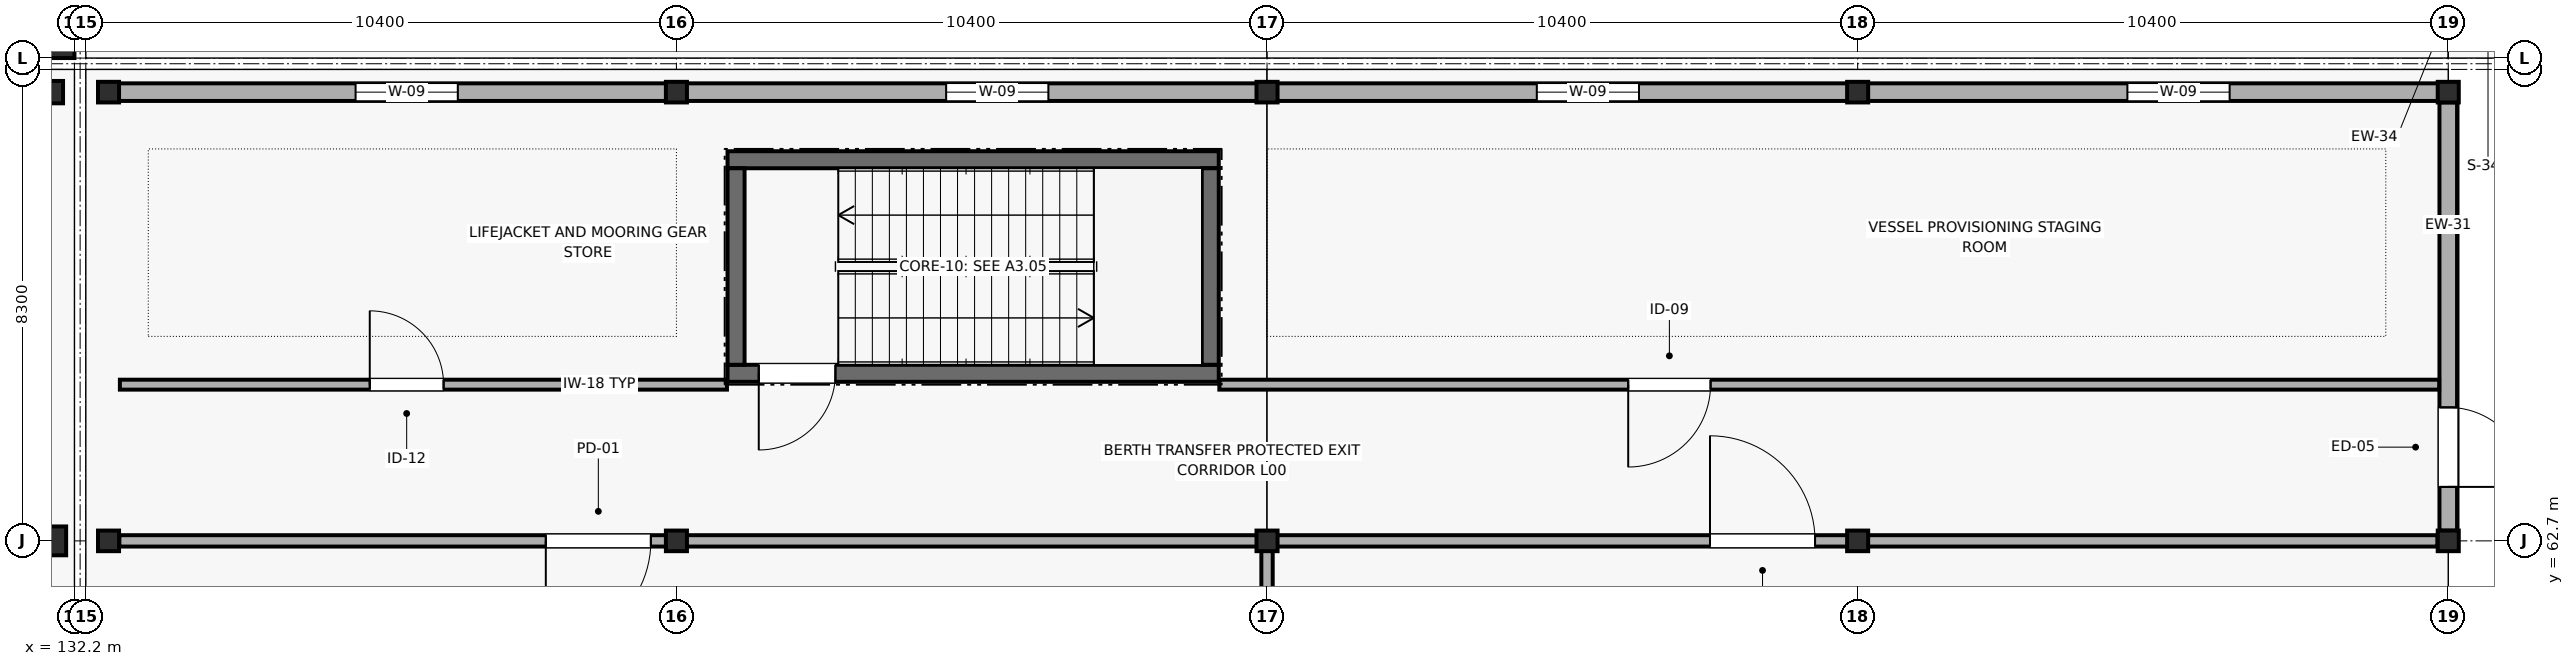
"""IFC4 building model, lengths in metres.
Left out: names, types, materials, properties, quantities, classifications, styles, units other than length and angle.
Written with IfcOpenShell. Run it as: python <this file> out.ifc"""

import sys

from ifc_helpers import new_model, si_unit, direction, frame, frame_2d, origin, origin_2d, place, context, subcontext, project, spatial, rectangle, hollow_circle, i_section, extrude, element, fill, save


model = new_model("IFC4")
c1 = context("Model", 3, precision=1e-05, world=origin(), true_north=direction((0.0, 1.0)))
c2 = subcontext(c1, "Body", "Model", "MODEL_VIEW")
j1 = project(units=[si_unit("LENGTHUNIT", "METRE"), si_unit("PLANEANGLEUNIT", "RADIAN")], contexts=[c1])
p1 = place(None, origin())
s1 = spatial("IfcSite", under=j1, at=p1, CompositionType="ELEMENT")
p2 = place(p1, origin())
s2 = spatial("IfcBuilding", under=s1, at=p2, CompositionType="ELEMENT")
p3 = place(p2, origin())
s3 = spatial("IfcBuildingStorey", under=s2, at=p3, CompositionType="ELEMENT", Elevation=0.0)
p4 = place(p3, frame((131.8, 62.7, 0.0), z_axis=(0.0, 0.0, 1.0), x_axis=(1.0, 0.0, 0.0)))
e1 = element("IfcColumn", 1, at=p4, inside=s3, PredefinedType="COLUMN", context=c2, shape_type="SweptSolid", body=[
    extrude(hollow_circle(Radius=0.254, WallThickness=0.012, at=origin_2d()), origin(), (0.0, 0.0, 1.0), 5.4),
])
p5 = place(p3, frame((131.8, 70.6, 0.0), z_axis=(0.0, 0.0, 1.0), x_axis=(1.0, 0.0, 0.0)))
e2 = element("IfcColumn", 2, at=p5, inside=s3, PredefinedType="COLUMN", context=c2, shape_type="SweptSolid", body=[
    extrude(i_section(OverallWidth=0.399, OverallDepth=0.394, WebThickness=0.023, FlangeThickness=0.037, FilletRadius=0.018, at=origin_2d()), origin(), (0.0, 0.0, 1.0), 5.4),
])
for number, where, z_axis, x_axis in (
    (3, (132.8, 62.7, 0.0), (0.0, 0.0, 1.0), (1.0, 0.0, 0.0)),
    (4, (132.8, 70.6, 0.0), (0.0, 0.0, 1.0), (1.0, 0.0, 0.0)),
    (5, (142.8, 62.7, 0.0), (0.0, 0.0, 1.0), (1.0, 0.0, 0.0)),
    (6, (142.8, 70.6, 0.0), (0.0, 0.0, 1.0), (1.0, 0.0, 0.0)),
    (7, (153.2, 62.7, 0.0), (0.0, 0.0, 1.0), (1.0, 0.0, 0.0)),
    (8, (153.2, 70.6, 0.0), (0.0, 0.0, 1.0), (1.0, 0.0, 0.0)),
    (9, (163.6, 62.7, 0.0), (0.0, 0.0, 1.0), (1.0, 0.0, 0.0)),
    (10, (163.6, 70.6, 0.0), (0.0, 0.0, 1.0), (1.0, 0.0, 0.0)),
    (11, (174.0, 62.7, 0.0), (0.0, 0.0, 1.0), (1.0, 0.0, 0.0)),
    (12, (174.0, 70.6, 0.0), (0.0, 0.0, 1.0), (1.0, 0.0, 0.0)),
):
    element("IfcColumn", number, at=place(p3, frame(where, z_axis=z_axis, x_axis=x_axis)), inside=s3, PredefinedType="COLUMN", context=c2, shape_type="SweptSolid", body=[
        extrude(i_section(OverallWidth=0.371, OverallDepth=0.363, WebThickness=0.013, FlangeThickness=0.022, FilletRadius=0.018, at=origin_2d()), origin(), (0.0, 0.0, 1.0), 5.4),
    ])
p6 = place(p3, frame((131.8, 71.6, 0.0), z_axis=(0.0, 0.0, 1.0), x_axis=(1.0, 0.0, 0.0)))
e13 = element("IfcColumn", 13, at=p6, inside=s3, PredefinedType="COLUMN", context=c2, shape_type="SweptSolid", body=[
    extrude(rectangle(XDim=0.8, YDim=0.8, at=origin_2d()), origin(), (0.0, 0.0, 1.0), 5.4),
])
p7 = place(p3, frame((174.0, 62.88, 0.0), z_axis=(0.0, 0.0, 1.0), x_axis=(0.0, 1.0, 0.0)))
e14 = element("IfcWall", 14, at=p7, inside=s3, PredefinedType="SOLIDWALL", context=c2, shape_type="SweptSolid", body=[
    extrude(rectangle(XDim=7.541, YDim=0.31, at=frame_2d((3.771, 0.0))), origin(), (0.0, 0.0, 1.0), 4.622),
])
p8 = place(p7, frame((0.771, 0.0, 0.0)))
e15 = element("IfcOpeningElement", 15, at=p8, cuts=e14, PredefinedType="OPENING", context=c2, shape_type="SweptSolid", body=[
    extrude(rectangle(XDim=1.4, YDim=2.25, at=frame_2d((0.7, 1.125))), frame((0.0, 0.165, 0.0), z_axis=(0.0, -1.0, 0.0), x_axis=(1.0, 0.0, 0.0)), (0.0, 0.0, 1.0), 0.33),
])
p9 = place(p3, frame((142.795, 70.6, 0.0), z_axis=(0.0, 0.0, 1.0), x_axis=(-1.0, 0.0, 0.0)))
e16 = element("IfcWall", 16, at=p9, inside=s3, PredefinedType="SOLIDWALL", context=c2, shape_type="SweptSolid", body=[
    extrude(rectangle(XDim=9.991, YDim=0.31, at=frame_2d((4.995, 0.0))), origin(), (0.0, 0.0, 1.0), 4.558),
])
p10 = place(p9, frame((3.845, 0.0, 1.05)))
e17 = element("IfcOpeningElement", 17, at=p10, cuts=e16, PredefinedType="OPENING", context=c2, shape_type="SweptSolid", body=[
    extrude(rectangle(XDim=1.8, YDim=1.8, at=frame_2d((0.9, 0.9))), frame((0.0, 0.165, 0.0), z_axis=(0.0, -1.0, 0.0), x_axis=(1.0, 0.0, 0.0)), (0.0, 0.0, 1.0), 0.33),
])
p11 = place(p3, frame((153.195, 70.6, 0.0), z_axis=(0.0, 0.0, 1.0), x_axis=(-1.0, 0.0, 0.0)))
e18 = element("IfcWall", 18, at=p11, inside=s3, PredefinedType="SOLIDWALL", context=c2, shape_type="SweptSolid", body=[
    extrude(rectangle(XDim=10.391, YDim=0.31, at=frame_2d((5.195, 0.0))), origin(), (0.0, 0.0, 1.0), 4.558),
])
p12 = place(p11, frame((3.845, 0.0, 1.05)))
e19 = element("IfcOpeningElement", 19, at=p12, cuts=e18, PredefinedType="OPENING", context=c2, shape_type="SweptSolid", body=[
    extrude(rectangle(XDim=1.8, YDim=1.8, at=frame_2d((0.9, 0.9))), frame((0.0, 0.165, 0.0), z_axis=(0.0, -1.0, 0.0), x_axis=(1.0, 0.0, 0.0)), (0.0, 0.0, 1.0), 0.33),
])
p13 = place(p3, frame((163.595, 70.6, 0.0), z_axis=(0.0, 0.0, 1.0), x_axis=(-1.0, 0.0, 0.0)))
e20 = element("IfcWall", 20, at=p13, inside=s3, PredefinedType="SOLIDWALL", context=c2, shape_type="SweptSolid", body=[
    extrude(rectangle(XDim=10.391, YDim=0.31, at=frame_2d((5.195, 0.0))), origin(), (0.0, 0.0, 1.0), 4.558),
])
p14 = place(p13, frame((3.845, 0.0, 1.05)))
e21 = element("IfcOpeningElement", 21, at=p14, cuts=e20, PredefinedType="OPENING", context=c2, shape_type="SweptSolid", body=[
    extrude(rectangle(XDim=1.8, YDim=1.8, at=frame_2d((0.9, 0.9))), frame((0.0, 0.165, 0.0), z_axis=(0.0, -1.0, 0.0), x_axis=(1.0, 0.0, 0.0)), (0.0, 0.0, 1.0), 0.33),
])
p15 = place(p3, frame((173.995, 70.6, 0.0), z_axis=(0.0, 0.0, 1.0), x_axis=(-1.0, 0.0, 0.0)))
e22 = element("IfcWall", 22, at=p15, inside=s3, PredefinedType="SOLIDWALL", context=c2, shape_type="SweptSolid", body=[
    extrude(rectangle(XDim=10.391, YDim=0.31, at=frame_2d((5.195, 0.0))), origin(), (0.0, 0.0, 1.0), 4.558),
])
p16 = place(p15, frame((3.845, 0.0, 1.05)))
e23 = element("IfcOpeningElement", 23, at=p16, cuts=e22, PredefinedType="OPENING", context=c2, shape_type="SweptSolid", body=[
    extrude(rectangle(XDim=1.8, YDim=1.8, at=frame_2d((0.9, 0.9))), frame((0.0, 0.165, 0.0), z_axis=(0.0, -1.0, 0.0), x_axis=(1.0, 0.0, 0.0)), (0.0, 0.0, 1.0), 0.33),
])
p17 = place(p3, frame((143.7, 65.65, 0.0), z_axis=(0.0, 0.0, 1.0), x_axis=(1.0, 0.0, 0.0)))
e24 = element("IfcWall", 24, at=p17, inside=s3, PredefinedType="SHEAR", context=c2, shape_type="SweptSolid", body=[
    extrude(rectangle(XDim=8.65, YDim=0.3, at=frame_2d((4.325, 0.0))), origin(), (0.0, 0.0, 1.0), 5.165),
])
p18 = place(p17, frame((0.55, 0.0, 0.0)))
e25 = element("IfcOpeningElement", 25, at=p18, cuts=e24, PredefinedType="OPENING", context=c2, shape_type="SweptSolid", body=[
    extrude(rectangle(XDim=1.35, YDim=2.2, at=frame_2d((0.675, 1.1))), frame((0.0, 0.16, 0.0), z_axis=(0.0, -1.0, 0.0), x_axis=(1.0, 0.0, 0.0)), (0.0, 0.0, 1.0), 0.32),
])
p19 = place(p3, frame((152.35, 69.41, 0.0), z_axis=(0.0, 0.0, 1.0), x_axis=(-1.0, 0.0, 0.0)))
e26 = element("IfcWall", 26, at=p19, inside=s3, PredefinedType="SHEAR", context=c2, shape_type="SweptSolid", body=[
    extrude(rectangle(XDim=8.65, YDim=0.3, at=frame_2d((4.325, 0.0))), origin(), (0.0, 0.0, 1.0), 5.165),
])
for number, where, z_axis, x_axis in (
    (27, (143.85, 69.26, 0.0), (0.0, 0.0, 1.0), (0.0, -1.0, 0.0)),
    (28, (152.2, 65.8, 0.0), (0.0, 0.0, 1.0), (0.0, 1.0, 0.0)),
):
    element("IfcWall", number, at=place(p3, frame(where, z_axis=z_axis, x_axis=x_axis)), inside=s3, PredefinedType="SHEAR", context=c2, shape_type="SweptSolid", body=[
        extrude(rectangle(XDim=3.46, YDim=0.3, at=frame_2d((1.73, 0.0))), origin(), (0.0, 0.0, 1.0), 5.165),
    ])
p20 = place(p3, frame((132.99, 62.7, 0.0), z_axis=(0.0, 0.0, 1.0), x_axis=(1.0, 0.0, 0.0)))
e29 = element("IfcWall", 29, at=p20, inside=s3, PredefinedType="PARTITIONING", context=c2, shape_type="SweptSolid", body=[
    extrude(rectangle(XDim=40.819, YDim=0.2, at=frame_2d((20.41, 0.0))), origin(), (0.0, 0.0, 1.0), 4.558),
])
p21 = place(p20, frame((7.51, 0.0, 0.0)))
e30 = element("IfcOpeningElement", 30, at=p21, cuts=e29, PredefinedType="OPENING", context=c2, shape_type="SweptSolid", body=[
    extrude(rectangle(XDim=1.85, YDim=2.4, at=frame_2d((0.925, 1.2))), frame((0.0, 0.11, 0.0), z_axis=(0.0, -1.0, 0.0), x_axis=(1.0, 0.0, 0.0)), (0.0, 0.0, 1.0), 0.22),
])
p22 = place(p20, frame((28.01, 0.0, 0.0)))
e31 = element("IfcOpeningElement", 31, at=p22, cuts=e29, PredefinedType="OPENING", context=c2, shape_type="SweptSolid", body=[
    extrude(rectangle(XDim=1.85, YDim=2.4, at=frame_2d((0.925, 1.2))), frame((0.0, 0.11, 0.0), z_axis=(0.0, -1.0, 0.0), x_axis=(1.0, 0.0, 0.0)), (0.0, 0.0, 1.0), 0.22),
])
p23 = place(p3, frame((153.2, 43.887, 0.0), z_axis=(0.0, 0.0, 1.0), x_axis=(0.0, 1.0, 0.0)))
e32 = element("IfcWall", 32, at=p23, inside=s3, PredefinedType="PARTITIONING", context=c2, shape_type="SweptSolid", body=[
    extrude(rectangle(XDim=18.708, YDim=0.2, at=frame_2d((9.354, 0.0))), origin(), (0.0, 0.0, 1.0), 4.622),
])
p24 = place(p23, frame((6.413, 0.0, 0.0)))
e33 = element("IfcOpeningElement", 33, at=p24, cuts=e32, PredefinedType="OPENING", context=c2, shape_type="SweptSolid", body=[
    extrude(rectangle(XDim=1.85, YDim=2.4, at=frame_2d((0.925, 1.2))), frame((0.0, 0.11, 0.0), z_axis=(0.0, -1.0, 0.0), x_axis=(1.0, 0.0, 0.0)), (0.0, 0.0, 1.0), 0.22),
])
p25 = place(p3, frame((133.0, 65.45, 0.0), z_axis=(0.0, 0.0, 1.0), x_axis=(1.0, 0.0, 0.0)))
e34 = element("IfcWall", 34, at=p25, inside=s3, PredefinedType="PARTITIONING", context=c2, shape_type="SweptSolid", body=[
    extrude(rectangle(XDim=10.69, YDim=0.175, at=frame_2d((5.345, 0.0))), origin(), (0.0, 0.0, 1.0), 4.622),
])
p26 = place(p25, frame((4.4, 0.0, 0.0)))
e35 = element("IfcOpeningElement", 35, at=p26, cuts=e34, PredefinedType="OPENING", context=c2, shape_type="SweptSolid", body=[
    extrude(rectangle(XDim=1.3, YDim=2.25, at=frame_2d((0.65, 1.125))), frame((0.0, 0.097, 0.0), z_axis=(0.0, -1.0, 0.0), x_axis=(1.0, 0.0, 0.0)), (0.0, 0.0, 1.0), 0.195),
])
p27 = place(p3, frame((152.36, 65.45, 0.0), z_axis=(0.0, 0.0, 1.0), x_axis=(1.0, 0.0, 0.0)))
e36 = element("IfcWall", 36, at=p27, inside=s3, PredefinedType="PARTITIONING", context=c2, shape_type="SweptSolid", body=[
    extrude(rectangle(XDim=21.48, YDim=0.175, at=frame_2d((10.74, 0.0))), origin(), (0.0, 0.0, 1.0), 4.622),
])
p28 = place(p27, frame((7.2, 0.0, 0.0)))
e37 = element("IfcOpeningElement", 37, at=p28, cuts=e36, PredefinedType="OPENING", context=c2, shape_type="SweptSolid", body=[
    extrude(rectangle(XDim=1.45, YDim=2.3, at=frame_2d((0.725, 1.15))), frame((0.0, 0.097, 0.0), z_axis=(0.0, -1.0, 0.0), x_axis=(1.0, 0.0, 0.0)), (0.0, 0.0, 1.0), 0.195),
])
p29 = place(p8, frame((1.4, 0.0, 0.0), z_axis=(0.0, 0.0, 1.0), x_axis=(-1.0, 0.0, 0.0)))
e38 = element("IfcDoor", 38, at=p29, inside=s3, OperationType="SINGLE_SWING_RIGHT", PredefinedType="DOOR", context=c2, shape_type="SweptSolid", body=[
    extrude(rectangle(XDim=1.4, YDim=2.25, at=frame_2d((0.7, 1.125))), frame((0.0, 0.025, 0.0), z_axis=(0.0, -1.0, 0.0), x_axis=(1.0, 0.0, 0.0)), (0.0, 0.0, 1.0), 0.05),
])
fill(e15, e38)
p30 = place(p10, origin())
e39 = element("IfcWindow", 39, at=p30, inside=s3, PartitioningType="SINGLE_PANEL", PredefinedType="WINDOW", context=c2, shape_type="SweptSolid", body=[
    extrude(rectangle(XDim=1.8, YDim=1.8, at=frame_2d((0.9, 0.9))), frame((0.0, 0.03, 0.0), z_axis=(0.0, -1.0, 0.0), x_axis=(1.0, 0.0, 0.0)), (0.0, 0.0, 1.0), 0.06),
])
fill(e17, e39)
p31 = place(p12, origin())
e40 = element("IfcWindow", 40, at=p31, inside=s3, PartitioningType="SINGLE_PANEL", PredefinedType="WINDOW", context=c2, shape_type="SweptSolid", body=[
    extrude(rectangle(XDim=1.8, YDim=1.8, at=frame_2d((0.9, 0.9))), frame((0.0, 0.03, 0.0), z_axis=(0.0, -1.0, 0.0), x_axis=(1.0, 0.0, 0.0)), (0.0, 0.0, 1.0), 0.06),
])
fill(e19, e40)
p32 = place(p14, origin())
e41 = element("IfcWindow", 41, at=p32, inside=s3, PartitioningType="SINGLE_PANEL", PredefinedType="WINDOW", context=c2, shape_type="SweptSolid", body=[
    extrude(rectangle(XDim=1.8, YDim=1.8, at=frame_2d((0.9, 0.9))), frame((0.0, 0.03, 0.0), z_axis=(0.0, -1.0, 0.0), x_axis=(1.0, 0.0, 0.0)), (0.0, 0.0, 1.0), 0.06),
])
fill(e21, e41)
p33 = place(p16, origin())
e42 = element("IfcWindow", 42, at=p33, inside=s3, PartitioningType="SINGLE_PANEL", PredefinedType="WINDOW", context=c2, shape_type="SweptSolid", body=[
    extrude(rectangle(XDim=1.8, YDim=1.8, at=frame_2d((0.9, 0.9))), frame((0.0, 0.03, 0.0), z_axis=(0.0, -1.0, 0.0), x_axis=(1.0, 0.0, 0.0)), (0.0, 0.0, 1.0), 0.06),
])
fill(e23, e42)
p34 = place(p18, frame((1.35, 0.0, 0.0), z_axis=(0.0, 0.0, 1.0), x_axis=(-1.0, 0.0, 0.0)))
e43 = element("IfcDoor", 43, at=p34, inside=s3, OperationType="SINGLE_SWING_RIGHT", PredefinedType="DOOR", context=c2, shape_type="SweptSolid", body=[
    extrude(rectangle(XDim=1.35, YDim=2.2, at=frame_2d((0.675, 1.1))), frame((0.0, 0.025, 0.0), z_axis=(0.0, -1.0, 0.0), x_axis=(1.0, 0.0, 0.0)), (0.0, 0.0, 1.0), 0.05),
])
fill(e25, e43)
p35 = place(p21, frame((1.85, 0.0, 0.0), z_axis=(0.0, 0.0, 1.0), x_axis=(-1.0, 0.0, 0.0)))
e44 = element("IfcDoor", 44, at=p35, inside=s3, OperationType="SINGLE_SWING_RIGHT", PredefinedType="DOOR", context=c2, shape_type="SweptSolid", body=[
    extrude(rectangle(XDim=1.85, YDim=2.4, at=frame_2d((0.925, 1.2))), frame((0.0, 0.025, 0.0), z_axis=(0.0, -1.0, 0.0), x_axis=(1.0, 0.0, 0.0)), (0.0, 0.0, 1.0), 0.05),
])
fill(e30, e44)
p36 = place(p22, origin())
e45 = element("IfcDoor", 45, at=p36, inside=s3, OperationType="SINGLE_SWING_LEFT", PredefinedType="DOOR", context=c2, shape_type="SweptSolid", body=[
    extrude(rectangle(XDim=1.85, YDim=2.4, at=frame_2d((0.925, 1.2))), frame((0.0, 0.025, 0.0), z_axis=(0.0, -1.0, 0.0), x_axis=(1.0, 0.0, 0.0)), (0.0, 0.0, 1.0), 0.05),
])
fill(e31, e45)
p37 = place(p26, origin())
e46 = element("IfcDoor", 46, at=p37, inside=s3, OperationType="SINGLE_SWING_LEFT", PredefinedType="DOOR", context=c2, shape_type="SweptSolid", body=[
    extrude(rectangle(XDim=1.3, YDim=2.25, at=frame_2d((0.65, 1.125))), frame((0.0, 0.025, 0.0), z_axis=(0.0, -1.0, 0.0), x_axis=(1.0, 0.0, 0.0)), (0.0, 0.0, 1.0), 0.05),
])
fill(e35, e46)
p38 = place(p28, frame((1.45, 0.0, 0.0), z_axis=(0.0, 0.0, 1.0), x_axis=(-1.0, 0.0, 0.0)))
e47 = element("IfcDoor", 47, at=p38, inside=s3, OperationType="SINGLE_SWING_RIGHT", PredefinedType="DOOR", context=c2, shape_type="SweptSolid", body=[
    extrude(rectangle(XDim=1.45, YDim=2.3, at=frame_2d((0.725, 1.15))), frame((0.0, 0.025, 0.0), z_axis=(0.0, -1.0, 0.0), x_axis=(1.0, 0.0, 0.0)), (0.0, 0.0, 1.0), 0.05),
])
fill(e37, e47)
save(model, sys.argv[1])
